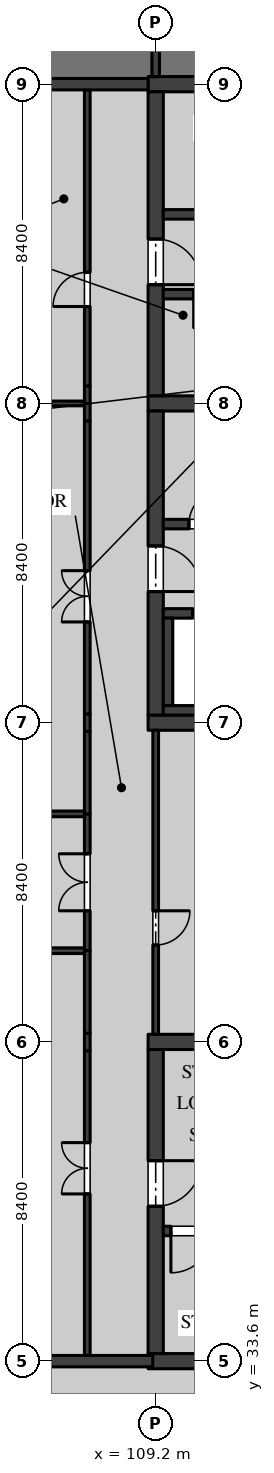
"""IFC4 building model, lengths in metres.
Left out: names, types, materials, properties, quantities, classifications, styles, units other than length and angle.
Written with IfcOpenShell. Run it as: python <this file> out.ifc"""

import sys

from ifc_helpers import new_model, si_unit, direction, frame, frame_2d, origin, place, context, subcontext, project, spatial, polyline, rectangle, outline, extrude, element, fill, save


model = new_model("IFC4")
c1 = context("Model", 3, precision=1e-05, world=origin(), true_north=direction((0.0, 1.0)))
c2 = subcontext(c1, "Body", "Model", "MODEL_VIEW")
j1 = project(units=[si_unit("LENGTHUNIT", "METRE"), si_unit("PLANEANGLEUNIT", "RADIAN")], contexts=[c1])
p1 = place(None, origin())
s1 = spatial("IfcSite", under=j1, at=p1, CompositionType="ELEMENT")
p2 = place(p1, origin())
s2 = spatial("IfcBuilding", under=s1, at=p2, CompositionType="ELEMENT")
p3 = place(p2, frame((0.0, 0.0, 5.4)))
s3 = spatial("IfcBuildingStorey", under=s2, at=p3, CompositionType="ELEMENT", Elevation=5.4)
p4 = place(p3, frame((109.0, 50.4, 0.0), z_axis=(0.0, 0.0, 1.0), x_axis=(1.0, 0.0, 0.0)))
e1 = element("IfcWall", 1, at=p4, inside=s3, PredefinedType="SHEAR", context=c2, shape_type="SweptSolid", body=[
    extrude(rectangle(XDim=8.8, YDim=0.4, at=frame_2d((4.4, 0.0))), origin(), (0.0, 0.0, 1.0), 4.37),
])
p5 = place(p3, frame((109.0, 58.8, 0.0), z_axis=(0.0, 0.0, 1.0), x_axis=(1.0, 0.0, 0.0)))
e2 = element("IfcWall", 2, at=p5, inside=s3, PredefinedType="SHEAR", context=c2, shape_type="SweptSolid", body=[
    extrude(rectangle(XDim=8.8, YDim=0.4, at=frame_2d((4.4, 0.0))), origin(), (0.0, 0.0, 1.0), 4.37),
])
p6 = place(p5, frame((6.65, 0.0, 0.0)))
e3 = element("IfcOpeningElement", 3, at=p6, cuts=e2, PredefinedType="OPENING", context=c2, shape_type="SweptSolid", body=[
    extrude(rectangle(XDim=1.1, YDim=2.1, at=frame_2d((0.55, 1.05))), frame((0.0, 0.21, 0.0), z_axis=(0.0, -1.0, 0.0), x_axis=(1.0, 0.0, 0.0)), (0.0, 0.0, 1.0), 0.42),
])
p7 = place(p3, frame((109.2, 50.6, 0.0), z_axis=(0.0, 0.0, 1.0), x_axis=(0.0, 1.0, 0.0)))
e4 = element("IfcWall", 4, at=p7, inside=s3, PredefinedType="SHEAR", context=c2, shape_type="SweptSolid", body=[
    extrude(rectangle(XDim=8.0, YDim=0.4, at=frame_2d((4.0, 0.0))), origin(), (0.0, 0.0, 1.0), 4.37),
])
p8 = place(p7, frame((3.25, 0.0, 0.0)))
e5 = element("IfcOpeningElement", 5, at=p8, cuts=e4, PredefinedType="OPENING", context=c2, shape_type="SweptSolid", body=[
    extrude(rectangle(XDim=1.2, YDim=2.1, at=frame_2d((0.6, 1.05))), frame((0.0, 0.21, 0.0), z_axis=(0.0, -1.0, 0.0), x_axis=(1.0, 0.0, 0.0)), (0.0, 0.0, 1.0), 0.42),
])
p9 = place(p3, frame((109.4, 55.625, 0.0), z_axis=(0.0, 0.0, 1.0), x_axis=(1.0, 0.0, 0.0)))
e6 = element("IfcWall", 6, at=p9, inside=s3, PredefinedType="SOLIDWALL", context=c2, shape_type="SweptSolid", body=[
    extrude(rectangle(XDim=2.25, YDim=0.25, at=frame_2d((1.125, 0.0))), origin(), (0.0, 0.0, 1.0), 4.37),
])
p10 = place(p9, frame((0.675, 0.0, 0.0)))
e7 = element("IfcOpeningElement", 7, at=p10, cuts=e6, PredefinedType="OPENING", context=c2, shape_type="SweptSolid", body=[
    extrude(rectangle(XDim=0.9, YDim=2.1, at=frame_2d((0.45, 1.05))), frame((0.0, 0.135, 0.0), z_axis=(0.0, -1.0, 0.0), x_axis=(1.0, 0.0, 0.0)), (0.0, 0.0, 1.0), 0.27),
])
p11 = place(p3, frame((109.0, 67.2, 0.0), z_axis=(0.0, 0.0, 1.0), x_axis=(1.0, 0.0, 0.0)))
e8 = element("IfcWall", 8, at=p11, inside=s3, PredefinedType="SHEAR", context=c2, shape_type="SweptSolid", body=[
    extrude(rectangle(XDim=8.8, YDim=0.4, at=frame_2d((4.4, 0.0))), origin(), (0.0, 0.0, 1.0), 4.37),
])
p12 = place(p3, frame((109.2, 59.0, 0.0), z_axis=(0.0, 0.0, 1.0), x_axis=(0.0, 1.0, 0.0)))
e9 = element("IfcWall", 9, at=p12, inside=s3, PredefinedType="SHEAR", context=c2, shape_type="SweptSolid", body=[
    extrude(rectangle(XDim=8.0, YDim=0.4, at=frame_2d((4.0, 0.0))), origin(), (0.0, 0.0, 1.0), 4.37),
])
p13 = place(p12, frame((2.925, 0.0, 0.0)))
e10 = element("IfcOpeningElement", 10, at=p13, cuts=e9, PredefinedType="OPENING", context=c2, shape_type="SweptSolid", body=[
    extrude(rectangle(XDim=1.2, YDim=2.1, at=frame_2d((0.6, 1.05))), frame((0.0, 0.21, 0.0), z_axis=(0.0, -1.0, 0.0), x_axis=(1.0, 0.0, 0.0)), (0.0, 0.0, 1.0), 0.42),
])
p14 = place(p3, frame((117.4, 63.775, 0.0), z_axis=(0.0, 0.0, 1.0), x_axis=(-1.0, 0.0, 0.0)))
e11 = element("IfcWall", 11, at=p14, inside=s3, PredefinedType="SOLIDWALL", context=c2, shape_type="SweptSolid", body=[
    extrude(rectangle(XDim=8.0, YDim=0.25, at=frame_2d((4.0, 0.0))), origin(), (0.0, 0.0, 1.0), 4.37),
])
p15 = place(p14, frame((0.2, 0.0, 0.0)))
e12 = element("IfcOpeningElement", 12, at=p15, cuts=e11, PredefinedType="OPENING", context=c2, shape_type="SweptSolid", body=[
    extrude(rectangle(XDim=1.1, YDim=2.1, at=frame_2d((0.55, 1.05))), frame((0.0, 0.135, 0.0), z_axis=(0.0, -1.0, 0.0), x_axis=(1.0, 0.0, 0.0)), (0.0, 0.0, 1.0), 0.27),
])
p16 = place(p3, frame((114.75, 61.675, 0.0), z_axis=(0.0, 0.0, 1.0), x_axis=(-1.0, 0.0, 0.0)))
e13 = element("IfcWall", 13, at=p16, inside=s3, PredefinedType="SOLIDWALL", context=c2, shape_type="SweptSolid", body=[
    extrude(rectangle(XDim=5.35, YDim=0.25, at=frame_2d((2.675, 0.0))), origin(), (0.0, 0.0, 1.0), 4.37),
])
p17 = place(p16, frame((3.65, 0.0, 0.0)))
e14 = element("IfcOpeningElement", 14, at=p17, cuts=e13, PredefinedType="OPENING", context=c2, shape_type="SweptSolid", body=[
    extrude(rectangle(XDim=0.9, YDim=2.1, at=frame_2d((0.45, 1.05))), frame((0.0, 0.135, 0.0), z_axis=(0.0, -1.0, 0.0), x_axis=(1.0, 0.0, 0.0)), (0.0, 0.0, 1.0), 0.27),
])
p18 = place(p16, frame((0.9, 0.0, 0.0)))
e15 = element("IfcOpeningElement", 15, at=p18, cuts=e13, PredefinedType="OPENING", context=c2, shape_type="SweptSolid", body=[
    extrude(rectangle(XDim=0.8, YDim=2.1, at=frame_2d((0.4, 1.05))), frame((0.0, 0.135, 0.0), z_axis=(0.0, -1.0, 0.0), x_axis=(1.0, 0.0, 0.0)), (0.0, 0.0, 1.0), 0.27),
])
for number, where, z_axis, x_axis in (
    (16, (109.0, 33.6, 0.0), (0.0, 0.0, 1.0), (1.0, 0.0, 0.0)),
    (17, (109.0, 42.0, 0.0), (0.0, 0.0, 1.0), (1.0, 0.0, 0.0)),
):
    element("IfcWall", number, at=place(p3, frame(where, z_axis=z_axis, x_axis=x_axis)), inside=s3, PredefinedType="SHEAR", context=c2, shape_type="SweptSolid", body=[
        extrude(rectangle(XDim=8.8, YDim=0.4, at=frame_2d((4.4, 0.0))), origin(), (0.0, 0.0, 1.0), 4.37),
    ])
p19 = place(p3, frame((109.2, 33.8, 0.0), z_axis=(0.0, 0.0, 1.0), x_axis=(0.0, 1.0, 0.0)))
e18 = element("IfcWall", 18, at=p19, inside=s3, PredefinedType="SHEAR", context=c2, shape_type="SweptSolid", body=[
    extrude(rectangle(XDim=8.0, YDim=0.4, at=frame_2d((4.0, 0.0))), origin(), (0.0, 0.0, 1.0), 4.37),
])
p20 = place(p19, frame((3.875, 0.0, 0.0)))
e19 = element("IfcOpeningElement", 19, at=p20, cuts=e18, PredefinedType="OPENING", context=c2, shape_type="SweptSolid", body=[
    extrude(rectangle(XDim=1.2, YDim=2.1, at=frame_2d((0.6, 1.05))), frame((0.0, 0.21, 0.0), z_axis=(0.0, -1.0, 0.0), x_axis=(1.0, 0.0, 0.0)), (0.0, 0.0, 1.0), 0.42),
])
p21 = place(p3, frame((109.4, 37.025, 0.0), z_axis=(0.0, 0.0, 1.0), x_axis=(1.0, 0.0, 0.0)))
e20 = element("IfcWall", 20, at=p21, inside=s3, PredefinedType="SOLIDWALL", context=c2, shape_type="SweptSolid", body=[
    extrude(rectangle(XDim=8.0, YDim=0.25, at=frame_2d((4.0, 0.0))), origin(), (0.0, 0.0, 1.0), 4.37),
])
p22 = place(p21, frame((0.2, 0.0, 0.0)))
e21 = element("IfcOpeningElement", 21, at=p22, cuts=e20, PredefinedType="OPENING", context=c2, shape_type="SweptSolid", body=[
    extrude(rectangle(XDim=1.1, YDim=2.1, at=frame_2d((0.55, 1.05))), frame((0.0, 0.135, 0.0), z_axis=(0.0, -1.0, 0.0), x_axis=(1.0, 0.0, 0.0)), (0.0, 0.0, 1.0), 0.27),
])
p23 = place(p3, frame((109.4, 53.275, 0.0), z_axis=(0.0, 0.0, 1.0), x_axis=(1.0, 0.0, 0.0)))
e22 = element("IfcWall", 22, at=p23, inside=s3, PredefinedType="SOLIDWALL", context=c2, shape_type="SweptSolid", body=[
    extrude(rectangle(XDim=2.65, YDim=0.25, at=frame_2d((1.325, 0.0))), origin(), (0.0, 0.0, 1.0), 4.37),
])
p24 = place(p23, frame((0.775, 0.0, 0.0)))
e23 = element("IfcOpeningElement", 23, at=p24, cuts=e22, PredefinedType="OPENING", context=c2, shape_type="SweptSolid", body=[
    extrude(rectangle(XDim=1.1, YDim=2.1, at=frame_2d((0.55, 1.05))), frame((0.0, 0.135, 0.0), z_axis=(0.0, -1.0, 0.0), x_axis=(1.0, 0.0, 0.0)), (0.0, 0.0, 1.0), 0.27),
])
p25 = place(p3, frame((109.4, 50.725, 0.0), z_axis=(0.0, 0.0, 1.0), x_axis=(1.0, 0.0, 0.0)))
e24 = element("IfcWall", 24, at=p25, inside=s3, PredefinedType="SOLIDWALL", context=c2, shape_type="SweptSolid", body=[
    extrude(rectangle(XDim=2.65, YDim=0.25, at=frame_2d((1.325, 0.0))), origin(), (0.0, 0.0, 1.0), 4.37),
])
p26 = place(p3, frame((109.525, 50.85, 0.0), z_axis=(0.0, 0.0, 1.0), x_axis=(0.0, 1.0, 0.0)))
e25 = element("IfcWall", 25, at=p26, inside=s3, PredefinedType="SOLIDWALL", context=c2, shape_type="SweptSolid", body=[
    extrude(rectangle(XDim=2.3, YDim=0.25, at=frame_2d((1.15, 0.0))), origin(), (0.0, 0.0, 1.0), 4.37),
])
p27 = place(p3, frame((107.4, 44.4, 0.0), z_axis=(0.0, 0.0, 1.0), x_axis=(0.0, 1.0, 0.0)))
e26 = element("IfcWall", 26, at=p27, inside=s3, PredefinedType="PARTITIONING", context=c2, shape_type="SweptSolid", body=[
    extrude(rectangle(XDim=3.6, YDim=0.15, at=frame_2d((1.8, 0.0))), origin(), (0.0, 0.0, 1.0), 4.37),
])
p28 = place(p27, frame((1.05, 0.0, 0.0)))
e27 = element("IfcOpeningElement", 27, at=p28, cuts=e26, PredefinedType="OPENING", context=c2, shape_type="SweptSolid", body=[
    extrude(rectangle(XDim=1.5, YDim=2.1, at=frame_2d((0.75, 1.05))), frame((0.0, 0.085, 0.0), z_axis=(0.0, -1.0, 0.0), x_axis=(1.0, 0.0, 0.0)), (0.0, 0.0, 1.0), 0.17),
])
for number, where, z_axis, x_axis in (
    (28, (106.17, 44.4, 0.0), (0.0, 0.0, 1.0), (1.0, 0.0, 0.0)),
    (29, (106.17, 48.0, 0.0), (0.0, 0.0, 1.0), (1.0, 0.0, 0.0)),
):
    element("IfcWall", number, at=place(p3, frame(where, z_axis=z_axis, x_axis=x_axis)), inside=s3, PredefinedType="PARTITIONING", context=c2, shape_type="SweptSolid", body=[
        extrude(rectangle(XDim=1.155, YDim=0.15, at=frame_2d((0.578, 0.0))), origin(), (0.0, 0.0, 1.0), 3.895),
    ])
p29 = place(p3, frame((109.2, 42.2, 0.0), z_axis=(0.0, 0.0, 1.0), x_axis=(0.0, 1.0, 0.0)))
e30 = element("IfcWall", 30, at=p29, inside=s3, PredefinedType="PARTITIONING", context=c2, shape_type="SweptSolid", body=[
    extrude(rectangle(XDim=8.0, YDim=0.15, at=frame_2d((4.0, 0.0))), origin(), (0.0, 0.0, 1.0), 3.746),
])
p30 = place(p29, frame((2.35, 0.0, 0.0)))
e31 = element("IfcOpeningElement", 31, at=p30, cuts=e30, PredefinedType="OPENING", context=c2, shape_type="SweptSolid", body=[
    extrude(rectangle(XDim=0.9, YDim=2.1, at=frame_2d((0.45, 1.05))), frame((0.0, 0.085, 0.0), z_axis=(0.0, -1.0, 0.0), x_axis=(1.0, 0.0, 0.0)), (0.0, 0.0, 1.0), 0.17),
])
p31 = place(p3, frame((107.4, 33.75, 0.0), z_axis=(0.0, 0.0, 1.0), x_axis=(0.0, 1.0, 0.0)))
e32 = element("IfcWall", 32, at=p31, inside=s3, PredefinedType="PARTITIONING", context=c2, shape_type="SweptSolid", body=[
    extrude(rectangle(XDim=8.02, YDim=0.15, at=frame_2d((4.01, 0.0))), origin(), (0.0, 0.0, 1.0), 4.37),
])
p32 = place(p31, frame((4.25, 0.0, 0.0)))
e33 = element("IfcOpeningElement", 33, at=p32, cuts=e32, PredefinedType="OPENING", context=c2, shape_type="SweptSolid", body=[
    extrude(rectangle(XDim=1.35, YDim=2.1, at=frame_2d((0.675, 1.05))), frame((0.0, 0.085, 0.0), z_axis=(0.0, -1.0, 0.0), x_axis=(1.0, 0.0, 0.0)), (0.0, 0.0, 1.0), 0.17),
])
p33 = place(p3, frame((107.4, 41.77, 0.0), z_axis=(0.0, 0.0, 1.0), x_axis=(0.0, 1.0, 0.0)))
e34 = element("IfcWall", 34, at=p33, inside=s3, PredefinedType="PARTITIONING", context=c2, shape_type="SweptSolid", body=[
    extrude(rectangle(XDim=0.46, YDim=0.15, at=frame_2d((0.23, 0.0))), origin(), (0.0, 0.0, 1.0), 3.746),
])
for number, where, z_axis, x_axis in (
    (35, (107.4, 42.23, 0.0), (0.0, 0.0, 1.0), (0.0, 1.0, 0.0)),
    (36, (107.4, 48.0, 0.0), (0.0, 0.0, 1.0), (0.0, 1.0, 0.0)),
):
    element("IfcWall", number, at=place(p3, frame(where, z_axis=z_axis, x_axis=x_axis)), inside=s3, PredefinedType="PARTITIONING", context=c2, shape_type="SweptSolid", body=[
        extrude(rectangle(XDim=2.17, YDim=0.15, at=frame_2d((1.085, 0.0))), origin(), (0.0, 0.0, 1.0), 4.37),
    ])
p34 = place(p3, frame((107.4, 50.17, 0.0), z_axis=(0.0, 0.0, 1.0), x_axis=(0.0, 1.0, 0.0)))
e37 = element("IfcWall", 37, at=p34, inside=s3, PredefinedType="PARTITIONING", context=c2, shape_type="SweptSolid", body=[
    extrude(rectangle(XDim=0.46, YDim=0.15, at=frame_2d((0.23, 0.0))), origin(), (0.0, 0.0, 1.0), 3.746),
])
p35 = place(p3, frame((107.4, 50.63, 0.0), z_axis=(0.0, 0.0, 1.0), x_axis=(0.0, 1.0, 0.0)))
e38 = element("IfcWall", 38, at=p35, inside=s3, PredefinedType="PARTITIONING", context=c2, shape_type="SweptSolid", body=[
    extrude(rectangle(XDim=7.71, YDim=0.15, at=frame_2d((3.855, 0.0))), origin(), (0.0, 0.0, 1.0), 4.37),
])
p36 = place(p35, frame((2.42, 0.0, 0.0)))
e39 = element("IfcOpeningElement", 39, at=p36, cuts=e38, PredefinedType="OPENING", context=c2, shape_type="SweptSolid", body=[
    extrude(rectangle(XDim=1.35, YDim=2.1, at=frame_2d((0.675, 1.05))), frame((0.0, 0.085, 0.0), z_axis=(0.0, -1.0, 0.0), x_axis=(1.0, 0.0, 0.0)), (0.0, 0.0, 1.0), 0.17),
])
for number, where, z_axis, x_axis in (
    (40, (107.4, 58.34, 0.0), (0.0, 0.0, 1.0), (0.0, 1.0, 0.0)),
    (41, (107.4, 58.8, 0.0), (0.0, 0.0, 1.0), (0.0, 1.0, 0.0)),
):
    element("IfcWall", number, at=place(p3, frame(where, z_axis=z_axis, x_axis=x_axis)), inside=s3, PredefinedType="PARTITIONING", context=c2, shape_type="SweptSolid", body=[
        extrude(rectangle(XDim=0.46, YDim=0.15, at=frame_2d((0.23, 0.0))), origin(), (0.0, 0.0, 1.0), 3.746),
    ])
p37 = place(p3, frame((107.4, 59.26, 0.0), z_axis=(0.0, 0.0, 1.0), x_axis=(0.0, 1.0, 0.0)))
e42 = element("IfcWall", 42, at=p37, inside=s3, PredefinedType="PARTITIONING", context=c2, shape_type="SweptSolid", body=[
    extrude(rectangle(XDim=7.79, YDim=0.15, at=frame_2d((3.895, 0.0))), origin(), (0.0, 0.0, 1.0), 4.37),
])
p38 = place(p37, frame((2.09, 0.0, 0.0)))
e43 = element("IfcOpeningElement", 43, at=p38, cuts=e42, PredefinedType="OPENING", context=c2, shape_type="SweptSolid", body=[
    extrude(rectangle(XDim=0.9, YDim=2.1, at=frame_2d((0.45, 1.05))), frame((0.0, 0.085, 0.0), z_axis=(0.0, -1.0, 0.0), x_axis=(1.0, 0.0, 0.0)), (0.0, 0.0, 1.0), 0.17),
])
p39 = place(p3, frame((105.0, 58.8, 0.0), z_axis=(0.0, 0.0, 1.0), x_axis=(1.0, 0.0, 0.0)))
e44 = element("IfcWall", 44, at=p39, inside=s3, PredefinedType="PARTITIONING", context=c2, shape_type="SweptSolid", body=[
    extrude(rectangle(XDim=2.325, YDim=0.125, at=frame_2d((1.163, 0.0))), origin(), (0.0, 0.0, 1.0), 3.746),
])
p40 = place(p3, frame((109.2, 67.4, 0.0), z_axis=(0.0, 0.0, 1.0), x_axis=(0.0, 1.0, 0.0)))
e45 = element("IfcWall", 45, at=p40, inside=s3, PredefinedType="PARTITIONING", context=c2, shape_type="SweptSolid", body=[
    extrude(rectangle(XDim=6.6, YDim=0.2, at=frame_2d((3.3, 0.0))), origin(), (0.0, 0.0, 1.0), 3.746),
])
p41 = place(p3, frame((109.122, 33.6, 0.0), z_axis=(0.0, 0.0, 1.0), x_axis=(-1.0, 0.0, 0.0)))
e46 = element("IfcWall", 46, at=p41, inside=s3, PredefinedType="SOLIDWALL", context=c2, shape_type="SweptSolid", body=[
    extrude(outline(polyline([(0.0, 0.0), (8.122, 0.0), (8.122, 3.6), (7.872, 3.6), (0.122, 3.6), (0.0, 3.6), (0.0, 0.0)])), frame((0.0, 0.15, 0.0), z_axis=(0.0, -1.0, 0.0), x_axis=(1.0, 0.0, 0.0)), (0.0, 0.0, 1.0), 0.3),
])
p42 = place(p3, frame((109.0, 67.2, 0.0), z_axis=(0.0, 0.0, 1.0), x_axis=(-1.0, 0.0, 0.0)))
e47 = element("IfcWall", 47, at=p42, inside=s3, PredefinedType="SOLIDWALL", context=c2, shape_type="SweptSolid", body=[
    extrude(rectangle(XDim=7.77, YDim=0.3, at=frame_2d((3.885, 0.0))), origin(), (0.0, 0.0, 1.0), 3.746),
])
p43 = place(p8, frame((1.2, 0.0, 0.0), z_axis=(0.0, 0.0, 1.0), x_axis=(-1.0, 0.0, 0.0)))
e48 = element("IfcDoor", 48, at=p43, inside=s3, OperationType="SINGLE_SWING_LEFT", PredefinedType="DOOR", context=c2, shape_type="SweptSolid", body=[
    extrude(rectangle(XDim=1.2, YDim=2.1, at=frame_2d((0.6, 1.05))), frame((0.0, 0.035, 0.0), z_axis=(0.0, -1.0, 0.0), x_axis=(1.0, 0.0, 0.0)), (0.0, 0.0, 1.0), 0.07),
])
fill(e5, e48)
p44 = place(p10, origin())
e49 = element("IfcDoor", 49, at=p44, inside=s3, OperationType="SINGLE_SWING_LEFT", PredefinedType="DOOR", context=c2, shape_type="SweptSolid", body=[
    extrude(rectangle(XDim=0.9, YDim=2.1, at=frame_2d((0.45, 1.05))), frame((0.0, 0.05, 0.0), z_axis=(0.0, -1.0, 0.0), x_axis=(1.0, 0.0, 0.0)), (0.0, 0.0, 1.0), 0.1),
])
fill(e7, e49)
p45 = place(p13, frame((1.2, 0.0, 0.0), z_axis=(0.0, 0.0, 1.0), x_axis=(-1.0, 0.0, 0.0)))
e50 = element("IfcDoor", 50, at=p45, inside=s3, OperationType="SINGLE_SWING_LEFT", PredefinedType="DOOR", context=c2, shape_type="SweptSolid", body=[
    extrude(rectangle(XDim=1.2, YDim=2.1, at=frame_2d((0.6, 1.05))), frame((0.0, 0.035, 0.0), z_axis=(0.0, -1.0, 0.0), x_axis=(1.0, 0.0, 0.0)), (0.0, 0.0, 1.0), 0.07),
])
fill(e10, e50)
p46 = place(p20, frame((1.2, 0.0, 0.0), z_axis=(0.0, 0.0, 1.0), x_axis=(-1.0, 0.0, 0.0)))
e51 = element("IfcDoor", 51, at=p46, inside=s3, OperationType="SINGLE_SWING_RIGHT", PredefinedType="DOOR", context=c2, shape_type="SweptSolid", body=[
    extrude(rectangle(XDim=1.2, YDim=2.1, at=frame_2d((0.6, 1.05))), frame((0.0, 0.035, 0.0), z_axis=(0.0, -1.0, 0.0), x_axis=(1.0, 0.0, 0.0)), (0.0, 0.0, 1.0), 0.07),
])
fill(e19, e51)
p47 = place(p22, frame((1.1, 0.0, 0.0), z_axis=(0.0, 0.0, 1.0), x_axis=(-1.0, 0.0, 0.0)))
e52 = element("IfcDoor", 52, at=p47, inside=s3, OperationType="SINGLE_SWING_LEFT", PredefinedType="DOOR", context=c2, shape_type="SweptSolid", body=[
    extrude(rectangle(XDim=1.1, YDim=2.1, at=frame_2d((0.55, 1.05))), frame((0.0, 0.035, 0.0), z_axis=(0.0, -1.0, 0.0), x_axis=(1.0, 0.0, 0.0)), (0.0, 0.0, 1.0), 0.07),
])
fill(e21, e52)
p48 = place(p24, origin())
e53 = element("IfcDoor", 53, at=p48, inside=s3, OperationType="DOUBLE_DOOR_SLIDING", PredefinedType="DOOR", context=c2, shape_type="SweptSolid", body=[
    extrude(rectangle(XDim=1.1, YDim=2.1, at=frame_2d((0.55, 1.05))), frame((0.0, 0.04, 0.0), z_axis=(0.0, -1.0, 0.0), x_axis=(1.0, 0.0, 0.0)), (0.0, 0.0, 1.0), 0.08),
])
fill(e23, e53)
p49 = place(p28, origin())
e54 = element("IfcDoor", 54, at=p49, inside=s3, OperationType="DOUBLE_DOOR_SINGLE_SWING", PredefinedType="DOOR", context=c2, shape_type="SweptSolid", body=[
    extrude(rectangle(XDim=1.5, YDim=2.1, at=frame_2d((0.75, 1.05))), frame((0.0, 0.025, 0.0), z_axis=(0.0, -1.0, 0.0), x_axis=(1.0, 0.0, 0.0)), (0.0, 0.0, 1.0), 0.05),
])
fill(e27, e54)
p50 = place(p30, frame((0.9, 0.0, 0.0), z_axis=(0.0, 0.0, 1.0), x_axis=(-1.0, 0.0, 0.0)))
e55 = element("IfcDoor", 55, at=p50, inside=s3, OperationType="SINGLE_SWING_RIGHT", PredefinedType="DOOR", context=c2, shape_type="SweptSolid", body=[
    extrude(rectangle(XDim=0.9, YDim=2.1, at=frame_2d((0.45, 1.05))), frame((0.0, 0.025, 0.0), z_axis=(0.0, -1.0, 0.0), x_axis=(1.0, 0.0, 0.0)), (0.0, 0.0, 1.0), 0.05),
])
fill(e31, e55)
p51 = place(p32, origin())
e56 = element("IfcDoor", 56, at=p51, inside=s3, OperationType="DOUBLE_DOOR_SINGLE_SWING", PredefinedType="DOOR", context=c2, shape_type="SweptSolid", body=[
    extrude(rectangle(XDim=1.35, YDim=2.1, at=frame_2d((0.675, 1.05))), frame((0.0, 0.025, 0.0), z_axis=(0.0, -1.0, 0.0), x_axis=(1.0, 0.0, 0.0)), (0.0, 0.0, 1.0), 0.05),
])
fill(e33, e56)
p52 = place(p36, origin())
e57 = element("IfcDoor", 57, at=p52, inside=s3, OperationType="DOUBLE_DOOR_SINGLE_SWING", PredefinedType="DOOR", context=c2, shape_type="SweptSolid", body=[
    extrude(rectangle(XDim=1.35, YDim=2.1, at=frame_2d((0.675, 1.05))), frame((0.0, 0.025, 0.0), z_axis=(0.0, -1.0, 0.0), x_axis=(1.0, 0.0, 0.0)), (0.0, 0.0, 1.0), 0.05),
])
fill(e39, e57)
p53 = place(p38, origin())
e58 = element("IfcDoor", 58, at=p53, inside=s3, OperationType="SINGLE_SWING_RIGHT", PredefinedType="DOOR", context=c2, shape_type="SweptSolid", body=[
    extrude(rectangle(XDim=0.9, YDim=2.1, at=frame_2d((0.45, 1.05))), frame((0.0, 0.025, 0.0), z_axis=(0.0, -1.0, 0.0), x_axis=(1.0, 0.0, 0.0)), (0.0, 0.0, 1.0), 0.05),
])
fill(e43, e58)
save(model, sys.argv[1])
